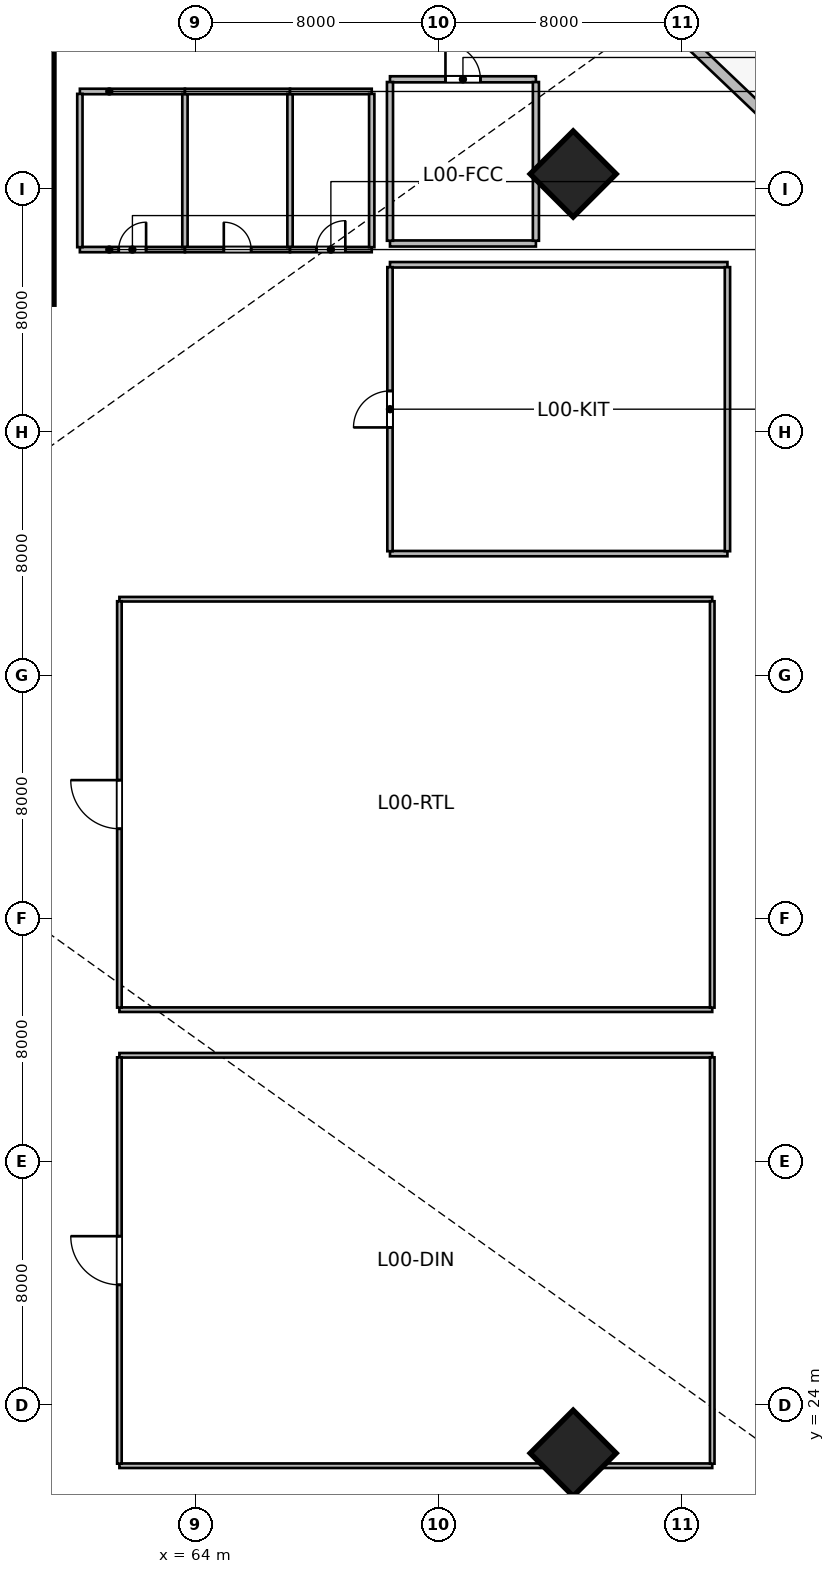
"""IFC4 building model, lengths in metres.
Left out: names, types, materials, properties, quantities, classifications, styles, units other than length and angle.
Written with IfcOpenShell. Run it as: python <this file> out.ifc"""

import sys

from ifc_helpers import new_model, si_unit, direction, frame, frame_2d, origin, origin_2d, place, context, subcontext, project, spatial, rectangle, extrude, source, transform, mapped, element, fill, save


model = new_model("IFC4")
c1 = context("Model", 3, precision=1e-05, world=origin(), true_north=direction((0.0, 1.0)))
c2 = subcontext(c1, "Body", "Model", "MODEL_VIEW")
j1 = project(units=[si_unit("LENGTHUNIT", "METRE"), si_unit("PLANEANGLEUNIT", "RADIAN")], contexts=[c1])
p1 = place(None, origin())
s1 = spatial("IfcSite", under=j1, at=p1, CompositionType="ELEMENT")
p2 = place(p1, origin())
s2 = spatial("IfcBuilding", under=s1, at=p2, CompositionType="ELEMENT")
p3 = place(p2, origin())
s3 = spatial("IfcBuildingStorey", under=s2, at=p3, CompositionType="ELEMENT", Elevation=0.0)
m1 = source(origin(), c2, "Body", "SweptSolid", [
    extrude(rectangle(XDim=12.0, YDim=0.55, at=frame_2d((6.0, 0.0))), origin(), (0.0, 0.0, 1.0), 6.0),
])
p4 = place(p3, frame((59.075, 60.2, 0.0), z_axis=(0.0, 0.0, 1.0), x_axis=(0.0, 1.0, 0.0)))
e1 = element("IfcWall", 1, at=p4, inside=s3, PredefinedType="SHEAR", context=c2, shape_type="MappedRepresentation", body=[
    mapped(m1, transform((0.0, 0.0, 0.0), scale=1.0)),
])
m2 = source(origin(), c2, "Body", "SweptSolid", [
    extrude(rectangle(XDim=2.0, YDim=2.0, at=origin_2d()), origin(), (0.0, 0.0, 1.0), 6.0),
])
for number, where, z_axis, x_axis in (
    (2, (76.426, 64.486, 0.0), (0.0, 0.0, 1.0), (0.707, 0.707, 0.0)),
    (3, (76.426, 22.412, 0.0), (0.0, 0.0, 1.0), (0.707, -0.707, 0.0)),
):
    element("IfcColumn", number, at=place(p3, frame(where, z_axis=z_axis, x_axis=x_axis)), inside=s3, PredefinedType="COLUMN", context=c2, shape_type="MappedRepresentation", body=[
        mapped(m2, transform((0.0, 0.0, 0.0), scale=1.0)),
    ])
m3 = source(origin(), c2, "Body", "SweptSolid", [
    extrude(rectangle(XDim=5.419, YDim=0.35, at=frame_2d((2.709, 0.0))), origin(), (0.0, 0.0, 1.0), 5.7),
])
p5 = place(p3, frame((80.173, 68.87, 0.0), z_axis=(0.0, 0.0, 1.0), x_axis=(0.724150787336, -0.689641673046, 0.0)))
e4 = element("IfcWall", 4, at=p5, inside=s3, PredefinedType="SOLIDWALL", context=c2, shape_type="MappedRepresentation", body=[
    mapped(m3, transform((0.0, 0.0, 0.0), scale=1.0)),
])
m4 = source(origin(), c2, "Body", "SweptSolid", [
    extrude(rectangle(XDim=4.535, YDim=0.35, at=frame_2d((2.268, 0.0))), origin(), (0.0, 0.0, 1.0), 5.7),
])
p6 = place(p3, frame((84.098, 21.154, 0.0), z_axis=(0.0, 0.0, 1.0), x_axis=(-0.86528620064, -0.501278157295, 0.0)))
e5 = element("IfcWall", 5, at=p6, inside=s3, PredefinedType="SOLIDWALL", context=c2, shape_type="MappedRepresentation", body=[
    mapped(m4, transform((0.0, 0.0, 0.0), scale=1.0)),
])
m5 = source(origin(), c2, "Body", "SweptSolid", [
    extrude(rectangle(XDim=3.456, YDim=0.175, at=frame_2d((1.728, 0.0))), origin(), (0.0, 0.0, 1.0), 5.7),
])
p7 = place(p3, frame((60.2, 62.0, 0.0), z_axis=(0.0, 0.0, 1.0), x_axis=(1.0, 0.0, 0.0)))
e6 = element("IfcWall", 6, at=p7, inside=s3, PredefinedType="PARTITIONING", context=c2, shape_type="MappedRepresentation", body=[
    mapped(m5, transform((0.0, 0.0, 0.0), scale=1.0)),
])
p8 = place(p7, frame((1.278, 0.0, 0.0)))
e7 = element("IfcOpeningElement", 7, at=p8, cuts=e6, PredefinedType="OPENING", context=c2, shape_type="SweptSolid", body=[
    extrude(rectangle(XDim=0.9, YDim=2.08, at=frame_2d((0.45, 1.04))), frame((0.0, 0.098, 0.0), z_axis=(0.0, -1.0, 0.0), x_axis=(1.0, 0.0, 0.0)), (0.0, 0.0, 1.0), 0.195),
])
m6 = source(origin(), c2, "Body", "SweptSolid", [
    extrude(rectangle(XDim=3.456, YDim=0.18, at=frame_2d((1.728, 0.0))), origin(), (0.0, 0.0, 1.0), 5.7),
])
p9 = place(p3, frame((60.2, 67.2, 0.0), z_axis=(0.0, 0.0, 1.0), x_axis=(1.0, 0.0, 0.0)))
e8 = element("IfcWall", 8, at=p9, inside=s3, PredefinedType="PLUMBINGWALL", context=c2, shape_type="MappedRepresentation", body=[
    mapped(m6, transform((0.0, 0.0, 0.0), scale=1.0)),
])
m7 = source(origin(), c2, "Body", "SweptSolid", [
    extrude(rectangle(XDim=5.043, YDim=0.175, at=frame_2d((2.521, 0.0))), origin(), (0.0, 0.0, 1.0), 5.7),
])
for number, where, z_axis, x_axis in (
    (9, (60.2, 62.079, 0.0), (0.0, 0.0, 1.0), (0.0, 1.0, 0.0)),
    (10, (63.656, 62.079, 0.0), (0.0, 0.0, 1.0), (0.0, 1.0, 0.0)),
):
    element("IfcWall", number, at=place(p3, frame(where, z_axis=z_axis, x_axis=x_axis)), inside=s3, PredefinedType="PARTITIONING", context=c2, shape_type="MappedRepresentation", body=[
        mapped(m7, transform((0.0, 0.0, 0.0), scale=1.0)),
    ])
p10 = place(p3, frame((63.656, 62.0, 0.0), z_axis=(0.0, 0.0, 1.0), x_axis=(1.0, 0.0, 0.0)))
e11 = element("IfcWall", 11, at=p10, inside=s3, PredefinedType="PARTITIONING", context=c2, shape_type="MappedRepresentation", body=[
    mapped(m5, transform((0.0, 0.0, 0.0), scale=1.0)),
])
p11 = place(p10, frame((1.278, 0.0, 0.0)))
e12 = element("IfcOpeningElement", 12, at=p11, cuts=e11, PredefinedType="OPENING", context=c2, shape_type="SweptSolid", body=[
    extrude(rectangle(XDim=0.9, YDim=2.08, at=frame_2d((0.45, 1.04))), frame((0.0, 0.098, 0.0), z_axis=(0.0, -1.0, 0.0), x_axis=(1.0, 0.0, 0.0)), (0.0, 0.0, 1.0), 0.195),
])
p12 = place(p3, frame((63.656, 67.2, 0.0), z_axis=(0.0, 0.0, 1.0), x_axis=(1.0, 0.0, 0.0)))
e13 = element("IfcWall", 13, at=p12, inside=s3, PredefinedType="PLUMBINGWALL", context=c2, shape_type="MappedRepresentation", body=[
    mapped(m6, transform((0.0, 0.0, 0.0), scale=1.0)),
])
p13 = place(p3, frame((67.112, 62.079, 0.0), z_axis=(0.0, 0.0, 1.0), x_axis=(0.0, 1.0, 0.0)))
e14 = element("IfcWall", 14, at=p13, inside=s3, PredefinedType="PARTITIONING", context=c2, shape_type="MappedRepresentation", body=[
    mapped(m7, transform((0.0, 0.0, 0.0), scale=1.0)),
])
m8 = source(origin(), c2, "Body", "SweptSolid", [
    extrude(rectangle(XDim=2.688, YDim=0.175, at=frame_2d((1.344, 0.0))), origin(), (0.0, 0.0, 1.0), 5.7),
])
p14 = place(p3, frame((67.112, 62.0, 0.0), z_axis=(0.0, 0.0, 1.0), x_axis=(1.0, 0.0, 0.0)))
e15 = element("IfcWall", 15, at=p14, inside=s3, PredefinedType="PARTITIONING", context=c2, shape_type="MappedRepresentation", body=[
    mapped(m8, transform((0.0, 0.0, 0.0), scale=1.0)),
])
p15 = place(p14, frame((0.869, 0.0, 0.0)))
e16 = element("IfcOpeningElement", 16, at=p15, cuts=e15, PredefinedType="OPENING", context=c2, shape_type="SweptSolid", body=[
    extrude(rectangle(XDim=0.95, YDim=2.12, at=frame_2d((0.475, 1.06))), frame((0.0, 0.098, 0.0), z_axis=(0.0, -1.0, 0.0), x_axis=(1.0, 0.0, 0.0)), (0.0, 0.0, 1.0), 0.195),
])
m9 = source(origin(), c2, "Body", "SweptSolid", [
    extrude(rectangle(XDim=2.688, YDim=0.18, at=frame_2d((1.344, 0.0))), origin(), (0.0, 0.0, 1.0), 5.7),
])
p16 = place(p3, frame((67.112, 67.2, 0.0), z_axis=(0.0, 0.0, 1.0), x_axis=(1.0, 0.0, 0.0)))
e17 = element("IfcWall", 17, at=p16, inside=s3, PredefinedType="PLUMBINGWALL", context=c2, shape_type="MappedRepresentation", body=[
    mapped(m9, transform((0.0, 0.0, 0.0), scale=1.0)),
])
p17 = place(p3, frame((69.8, 62.079, 0.0), z_axis=(0.0, 0.0, 1.0), x_axis=(0.0, 1.0, 0.0)))
e18 = element("IfcWall", 18, at=p17, inside=s3, PredefinedType="PARTITIONING", context=c2, shape_type="MappedRepresentation", body=[
    mapped(m7, transform((0.0, 0.0, 0.0), scale=1.0)),
])
m10 = source(origin(), c2, "Body", "SweptSolid", [
    extrude(rectangle(XDim=4.8, YDim=0.2, at=frame_2d((2.4, 0.0))), origin(), (0.0, 0.0, 1.0), 5.7),
])
p18 = place(p3, frame((70.4, 62.2, 0.0), z_axis=(0.0, 0.0, 1.0), x_axis=(1.0, 0.0, 0.0)))
e19 = element("IfcWall", 19, at=p18, inside=s3, PredefinedType="SOLIDWALL", context=c2, shape_type="MappedRepresentation", body=[
    mapped(m10, transform((0.0, 0.0, 0.0), scale=1.0)),
])
m11 = source(origin(), c2, "Body", "SweptSolid", [
    extrude(rectangle(XDim=4.8, YDim=0.2, at=frame_2d((2.4, 0.0))), origin(), (0.0, 0.0, 1.0), 4.761),
])
p19 = place(p3, frame((70.4, 67.6, 0.0), z_axis=(0.0, 0.0, 1.0), x_axis=(1.0, 0.0, 0.0)))
e20 = element("IfcWall", 20, at=p19, inside=s3, PredefinedType="SOLIDWALL", context=c2, shape_type="MappedRepresentation", body=[
    mapped(m11, transform((0.0, 0.0, 0.0), scale=1.0)),
])
p20 = place(p19, frame((1.825, 0.0, 0.0)))
e21 = element("IfcOpeningElement", 21, at=p20, cuts=e20, PredefinedType="OPENING", context=c2, shape_type="SweptSolid", body=[
    extrude(rectangle(XDim=1.15, YDim=2.15, at=frame_2d((0.575, 1.075))), frame((0.0, 0.11, 0.0), z_axis=(0.0, -1.0, 0.0), x_axis=(1.0, 0.0, 0.0)), (0.0, 0.0, 1.0), 0.22),
])
m12 = source(origin(), c2, "Body", "SweptSolid", [
    extrude(rectangle(XDim=5.22, YDim=0.2, at=frame_2d((2.61, 0.0))), origin(), (0.0, 0.0, 1.0), 5.7),
])
for number, where, z_axis, x_axis in (
    (22, (70.4, 62.29, 0.0), (0.0, 0.0, 1.0), (0.0, 1.0, 0.0)),
    (23, (75.2, 62.29, 0.0), (0.0, 0.0, 1.0), (0.0, 1.0, 0.0)),
):
    element("IfcWall", number, at=place(p3, frame(where, z_axis=z_axis, x_axis=x_axis)), inside=s3, PredefinedType="SOLIDWALL", context=c2, shape_type="MappedRepresentation", body=[
        mapped(m12, transform((0.0, 0.0, 0.0), scale=1.0)),
    ])
m13 = source(origin(), c2, "Body", "SweptSolid", [
    extrude(rectangle(XDim=19.5, YDim=0.15, at=frame_2d((9.75, 0.0))), origin(), (0.0, 0.0, 1.0), 4.761),
])
p21 = place(p3, frame((61.5, 22.0, 0.0), z_axis=(0.0, 0.0, 1.0), x_axis=(1.0, 0.0, 0.0)))
e24 = element("IfcWall", 24, at=p21, inside=s3, PredefinedType="PARTITIONING", context=c2, shape_type="MappedRepresentation", body=[
    mapped(m13, transform((0.0, 0.0, 0.0), scale=1.0)),
])
m14 = source(origin(), c2, "Body", "SweptSolid", [
    extrude(rectangle(XDim=19.5, YDim=0.15, at=frame_2d((9.75, 0.0))), origin(), (0.0, 0.0, 1.0), 5.7),
])
p22 = place(p3, frame((61.5, 35.5, 0.0), z_axis=(0.0, 0.0, 1.0), x_axis=(1.0, 0.0, 0.0)))
e25 = element("IfcWall", 25, at=p22, inside=s3, PredefinedType="PARTITIONING", context=c2, shape_type="MappedRepresentation", body=[
    mapped(m14, transform((0.0, 0.0, 0.0), scale=1.0)),
])
m15 = source(origin(), c2, "Body", "SweptSolid", [
    extrude(rectangle(XDim=13.365, YDim=0.15, at=frame_2d((6.683, 0.0))), origin(), (0.0, 0.0, 1.0), 5.7),
])
p23 = place(p3, frame((61.5, 22.067, 0.0), z_axis=(0.0, 0.0, 1.0), x_axis=(0.0, 1.0, 0.0)))
e26 = element("IfcWall", 26, at=p23, inside=s3, PredefinedType="PARTITIONING", context=c2, shape_type="MappedRepresentation", body=[
    mapped(m15, transform((0.0, 0.0, 0.0), scale=1.0)),
])
p24 = place(p23, frame((5.883, 0.0, 0.0)))
e27 = element("IfcOpeningElement", 27, at=p24, cuts=e26, PredefinedType="OPENING", context=c2, shape_type="SweptSolid", body=[
    extrude(rectangle(XDim=1.6, YDim=2.15, at=frame_2d((0.8, 1.075))), frame((0.0, 0.085, 0.0), z_axis=(0.0, -1.0, 0.0), x_axis=(1.0, 0.0, 0.0)), (0.0, 0.0, 1.0), 0.17),
])
p25 = place(p3, frame((81.0, 22.067, 0.0), z_axis=(0.0, 0.0, 1.0), x_axis=(0.0, 1.0, 0.0)))
e28 = element("IfcWall", 28, at=p25, inside=s3, PredefinedType="PARTITIONING", context=c2, shape_type="MappedRepresentation", body=[
    mapped(m15, transform((0.0, 0.0, 0.0), scale=1.0)),
])
m16 = source(origin(), c2, "Body", "SweptSolid", [
    extrude(rectangle(XDim=11.1, YDim=0.175, at=frame_2d((5.55, 0.0))), origin(), (0.0, 0.0, 1.0), 5.7),
])
p26 = place(p3, frame((70.4, 52.0, 0.0), z_axis=(0.0, 0.0, 1.0), x_axis=(1.0, 0.0, 0.0)))
e29 = element("IfcWall", 29, at=p26, inside=s3, PredefinedType="PARTITIONING", context=c2, shape_type="MappedRepresentation", body=[
    mapped(m16, transform((0.0, 0.0, 0.0), scale=1.0)),
])
m17 = source(origin(), c2, "Body", "SweptSolid", [
    extrude(rectangle(XDim=11.1, YDim=0.18, at=frame_2d((5.55, 0.0))), origin(), (0.0, 0.0, 1.0), 5.7),
])
p27 = place(p3, frame((70.4, 61.5, 0.0), z_axis=(0.0, 0.0, 1.0), x_axis=(1.0, 0.0, 0.0)))
e30 = element("IfcWall", 30, at=p27, inside=s3, PredefinedType="PLUMBINGWALL", context=c2, shape_type="MappedRepresentation", body=[
    mapped(m17, transform((0.0, 0.0, 0.0), scale=1.0)),
])
m18 = source(origin(), c2, "Body", "SweptSolid", [
    extrude(rectangle(XDim=9.343, YDim=0.175, at=frame_2d((4.671, 0.0))), origin(), (0.0, 0.0, 1.0), 5.7),
])
p28 = place(p3, frame((70.4, 52.079, 0.0), z_axis=(0.0, 0.0, 1.0), x_axis=(0.0, 1.0, 0.0)))
e31 = element("IfcWall", 31, at=p28, inside=s3, PredefinedType="PARTITIONING", context=c2, shape_type="MappedRepresentation", body=[
    mapped(m18, transform((0.0, 0.0, 0.0), scale=1.0)),
])
p29 = place(p28, frame((4.071, 0.0, 0.0)))
e32 = element("IfcOpeningElement", 32, at=p29, cuts=e31, PredefinedType="OPENING", context=c2, shape_type="SweptSolid", body=[
    extrude(rectangle(XDim=1.2, YDim=2.15, at=frame_2d((0.6, 1.075))), frame((0.0, 0.098, 0.0), z_axis=(0.0, -1.0, 0.0), x_axis=(1.0, 0.0, 0.0)), (0.0, 0.0, 1.0), 0.195),
])
p30 = place(p3, frame((81.5, 52.079, 0.0), z_axis=(0.0, 0.0, 1.0), x_axis=(0.0, 1.0, 0.0)))
e33 = element("IfcWall", 33, at=p30, inside=s3, PredefinedType="PARTITIONING", context=c2, shape_type="MappedRepresentation", body=[
    mapped(m18, transform((0.0, 0.0, 0.0), scale=1.0)),
])
for number, where, z_axis, x_axis in (
    (34, (61.5, 37.0, 0.0), (0.0, 0.0, 1.0), (1.0, 0.0, 0.0)),
    (35, (61.5, 50.5, 0.0), (0.0, 0.0, 1.0), (1.0, 0.0, 0.0)),
):
    element("IfcWall", number, at=place(p3, frame(where, z_axis=z_axis, x_axis=x_axis)), inside=s3, PredefinedType="PARTITIONING", context=c2, shape_type="MappedRepresentation", body=[
        mapped(m14, transform((0.0, 0.0, 0.0), scale=1.0)),
    ])
m19 = source(origin(), c2, "Body", "SweptSolid", [
    extrude(rectangle(XDim=13.365, YDim=0.15, at=frame_2d((6.683, 0.0))), origin(), (0.0, 0.0, 1.0), 4.834),
])
p31 = place(p3, frame((61.5, 37.067, 0.0), z_axis=(0.0, 0.0, 1.0), x_axis=(0.0, 1.0, 0.0)))
e36 = element("IfcWall", 36, at=p31, inside=s3, PredefinedType="PARTITIONING", context=c2, shape_type="MappedRepresentation", body=[
    mapped(m19, transform((0.0, 0.0, 0.0), scale=1.0)),
])
p32 = place(p31, frame((5.883, 0.0, 0.0)))
e37 = element("IfcOpeningElement", 37, at=p32, cuts=e36, PredefinedType="OPENING", context=c2, shape_type="SweptSolid", body=[
    extrude(rectangle(XDim=1.6, YDim=2.15, at=frame_2d((0.8, 1.075))), frame((0.0, 0.085, 0.0), z_axis=(0.0, -1.0, 0.0), x_axis=(1.0, 0.0, 0.0)), (0.0, 0.0, 1.0), 0.17),
])
p33 = place(p3, frame((81.0, 37.067, 0.0), z_axis=(0.0, 0.0, 1.0), x_axis=(0.0, 1.0, 0.0)))
e38 = element("IfcWall", 38, at=p33, inside=s3, PredefinedType="PARTITIONING", context=c2, shape_type="MappedRepresentation", body=[
    mapped(m15, transform((0.0, 0.0, 0.0), scale=1.0)),
])
m20 = source(origin(), c2, "Body", "SweptSolid", [
    extrude(rectangle(XDim=0.9, YDim=2.08, at=frame_2d((0.45, 1.04))), frame((0.0, 0.025, 0.0), z_axis=(0.0, -1.0, 0.0), x_axis=(1.0, 0.0, 0.0)), (0.0, 0.0, 1.0), 0.05),
])
p34 = place(p8, origin())
e39 = element("IfcDoor", 39, at=p34, inside=s3, OperationType="SINGLE_SWING_RIGHT", PredefinedType="DOOR", context=c2, shape_type="MappedRepresentation", body=[
    mapped(m20, transform((0.0, 0.0, 0.0), scale=1.0)),
])
fill(e7, e39)
p35 = place(p11, origin())
e40 = element("IfcDoor", 40, at=p35, inside=s3, OperationType="SINGLE_SWING_LEFT", PredefinedType="DOOR", context=c2, shape_type="MappedRepresentation", body=[
    mapped(m20, transform((0.0, 0.0, 0.0), scale=1.0)),
])
fill(e12, e40)
m21 = source(origin(), c2, "Body", "SweptSolid", [
    extrude(rectangle(XDim=0.95, YDim=2.12, at=frame_2d((0.475, 1.06))), frame((0.0, 0.025, 0.0), z_axis=(0.0, -1.0, 0.0), x_axis=(1.0, 0.0, 0.0)), (0.0, 0.0, 1.0), 0.05),
])
p36 = place(p15, origin())
e41 = element("IfcDoor", 41, at=p36, inside=s3, OperationType="SINGLE_SWING_RIGHT", PredefinedType="DOOR", context=c2, shape_type="MappedRepresentation", body=[
    mapped(m21, transform((0.0, 0.0, 0.0), scale=1.0)),
])
fill(e16, e41)
m22 = source(origin(), c2, "Body", "SweptSolid", [
    extrude(rectangle(XDim=1.15, YDim=2.15, at=frame_2d((0.575, 1.075))), frame((0.0, 0.025, 0.0), z_axis=(0.0, -1.0, 0.0), x_axis=(1.0, 0.0, 0.0)), (0.0, 0.0, 1.0), 0.05),
])
p37 = place(p20, origin())
e42 = element("IfcDoor", 42, at=p37, inside=s3, OperationType="SINGLE_SWING_LEFT", PredefinedType="DOOR", context=c2, shape_type="MappedRepresentation", body=[
    mapped(m22, transform((0.0, 0.0, 0.0), scale=1.0)),
])
fill(e21, e42)
m23 = source(origin(), c2, "Body", "SweptSolid", [
    extrude(rectangle(XDim=1.6, YDim=2.15, at=frame_2d((0.8, 1.075))), frame((0.0, 0.025, 0.0), z_axis=(0.0, -1.0, 0.0), x_axis=(1.0, 0.0, 0.0)), (0.0, 0.0, 1.0), 0.05),
])
p38 = place(p24, origin())
e43 = element("IfcDoor", 43, at=p38, inside=s3, OperationType="SINGLE_SWING_RIGHT", PredefinedType="DOOR", context=c2, shape_type="MappedRepresentation", body=[
    mapped(m23, transform((0.0, 0.0, 0.0), scale=1.0)),
])
fill(e27, e43)
m24 = source(origin(), c2, "Body", "SweptSolid", [
    extrude(rectangle(XDim=1.2, YDim=2.15, at=frame_2d((0.6, 1.075))), frame((0.0, 0.025, 0.0), z_axis=(0.0, -1.0, 0.0), x_axis=(1.0, 0.0, 0.0)), (0.0, 0.0, 1.0), 0.05),
])
p39 = place(p29, origin())
e44 = element("IfcDoor", 44, at=p39, inside=s3, OperationType="SINGLE_SWING_LEFT", PredefinedType="DOOR", context=c2, shape_type="MappedRepresentation", body=[
    mapped(m24, transform((0.0, 0.0, 0.0), scale=1.0)),
])
fill(e32, e44)
p40 = place(p32, origin())
e45 = element("IfcDoor", 45, at=p40, inside=s3, OperationType="SINGLE_SWING_RIGHT", PredefinedType="DOOR", context=c2, shape_type="MappedRepresentation", body=[
    mapped(m23, transform((0.0, 0.0, 0.0), scale=1.0)),
])
fill(e37, e45)
save(model, sys.argv[1])
